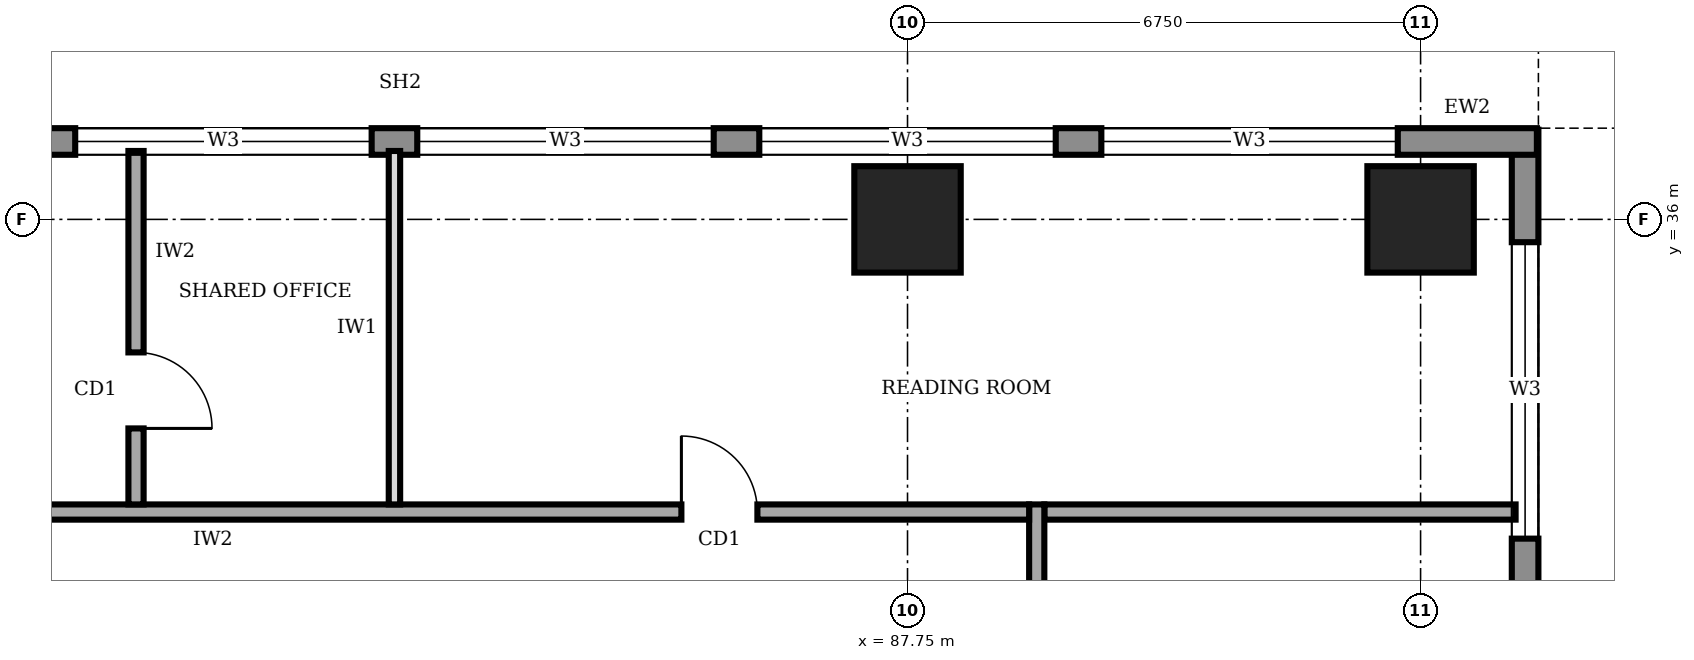
"""IFC4 building model, lengths in metres.
Left out: names, types, materials, properties, quantities, classifications, styles, units other than length and angle.
Written with IfcOpenShell. Run it as: python <this file> out.ifc"""

import sys

from ifc_helpers import new_model, si_unit, direction, frame, frame_2d, origin, origin_2d, place, context, subcontext, project, spatial, rectangle, extrude, element, fill, save


model = new_model("IFC4")
c1 = context("Model", 3, precision=1e-05, world=origin(), true_north=direction((0.0, 1.0)))
c2 = subcontext(c1, "Body", "Model", "MODEL_VIEW")
j1 = project(units=[si_unit("LENGTHUNIT", "METRE"), si_unit("PLANEANGLEUNIT", "RADIAN")], contexts=[c1])
p1 = place(None, origin())
s1 = spatial("IfcSite", under=j1, at=p1, CompositionType="ELEMENT")
p2 = place(p1, origin())
s2 = spatial("IfcBuilding", under=s1, at=p2, CompositionType="ELEMENT")
p3 = place(p2, frame((0.0, 0.0, 177.0)))
s3 = spatial("IfcBuildingStorey", under=s2, at=p3, CompositionType="ELEMENT", Elevation=177.0)
for number, where, z_axis, x_axis in (
    (1, (87.75, 36.0, 0.0), (0.0, 0.0, 1.0), (1.0, 0.0, 0.0)),
    (2, (94.5, 36.0, 0.0), (0.0, 0.0, 1.0), (1.0, 0.0, 0.0)),
):
    element("IfcColumn", number, at=place(p3, frame(where, z_axis=z_axis, x_axis=x_axis)), inside=s3, PredefinedType="COLUMN", context=c2, shape_type="SweptSolid", body=[
        extrude(rectangle(XDim=1.4, YDim=1.4, at=origin_2d()), origin(), (0.0, 0.0, 1.0), 4.0),
    ])
p4 = place(p3, frame((95.875, 3.32, 0.0), z_axis=(0.0, 0.0, 1.0), x_axis=(0.0, 1.0, 0.0)))
e3 = element("IfcWall", 3, at=p4, inside=s3, PredefinedType="STANDARD", context=c2, shape_type="SweptSolid", body=[
    extrude(rectangle(XDim=33.86, YDim=0.35, at=frame_2d((16.93, 0.0))), origin(), (0.0, 0.0, 1.0), 3.75),
])
p5 = place(p4, frame((1.48, 0.0, 0.95)))
e4 = element("IfcOpeningElement", 4, at=p5, cuts=e3, PredefinedType="OPENING", context=c2, shape_type="SweptSolid", body=[
    extrude(rectangle(XDim=3.9, YDim=1.8, at=frame_2d((1.95, 0.9))), frame((0.0, 0.185, 0.0), z_axis=(0.0, -1.0, 0.0), x_axis=(1.0, 0.0, 0.0)), (0.0, 0.0, 1.0), 0.37),
])
p6 = place(p4, frame((5.98, 0.0, 0.95)))
e5 = element("IfcOpeningElement", 5, at=p6, cuts=e3, PredefinedType="OPENING", context=c2, shape_type="SweptSolid", body=[
    extrude(rectangle(XDim=3.9, YDim=1.8, at=frame_2d((1.95, 0.9))), frame((0.0, 0.185, 0.0), z_axis=(0.0, -1.0, 0.0), x_axis=(1.0, 0.0, 0.0)), (0.0, 0.0, 1.0), 0.37),
])
p7 = place(p4, frame((10.48, 0.0, 0.95)))
e6 = element("IfcOpeningElement", 6, at=p7, cuts=e3, PredefinedType="OPENING", context=c2, shape_type="SweptSolid", body=[
    extrude(rectangle(XDim=3.9, YDim=1.8, at=frame_2d((1.95, 0.9))), frame((0.0, 0.185, 0.0), z_axis=(0.0, -1.0, 0.0), x_axis=(1.0, 0.0, 0.0)), (0.0, 0.0, 1.0), 0.37),
])
p8 = place(p4, frame((14.98, 0.0, 0.95)))
e7 = element("IfcOpeningElement", 7, at=p8, cuts=e3, PredefinedType="OPENING", context=c2, shape_type="SweptSolid", body=[
    extrude(rectangle(XDim=3.9, YDim=1.8, at=frame_2d((1.95, 0.9))), frame((0.0, 0.185, 0.0), z_axis=(0.0, -1.0, 0.0), x_axis=(1.0, 0.0, 0.0)), (0.0, 0.0, 1.0), 0.37),
])
p9 = place(p4, frame((19.48, 0.0, 0.95)))
e8 = element("IfcOpeningElement", 8, at=p9, cuts=e3, PredefinedType="OPENING", context=c2, shape_type="SweptSolid", body=[
    extrude(rectangle(XDim=3.9, YDim=1.8, at=frame_2d((1.95, 0.9))), frame((0.0, 0.185, 0.0), z_axis=(0.0, -1.0, 0.0), x_axis=(1.0, 0.0, 0.0)), (0.0, 0.0, 1.0), 0.37),
])
p10 = place(p4, frame((23.98, 0.0, 0.95)))
e9 = element("IfcOpeningElement", 9, at=p10, cuts=e3, PredefinedType="OPENING", context=c2, shape_type="SweptSolid", body=[
    extrude(rectangle(XDim=3.9, YDim=1.8, at=frame_2d((1.95, 0.9))), frame((0.0, 0.185, 0.0), z_axis=(0.0, -1.0, 0.0), x_axis=(1.0, 0.0, 0.0)), (0.0, 0.0, 1.0), 0.37),
])
p11 = place(p4, frame((28.48, 0.0, 0.95)))
e10 = element("IfcOpeningElement", 10, at=p11, cuts=e3, PredefinedType="OPENING", context=c2, shape_type="SweptSolid", body=[
    extrude(rectangle(XDim=3.9, YDim=1.8, at=frame_2d((1.95, 0.9))), frame((0.0, 0.185, 0.0), z_axis=(0.0, -1.0, 0.0), x_axis=(1.0, 0.0, 0.0)), (0.0, 0.0, 1.0), 0.37),
])
p12 = place(p3, frame((96.03, 37.025, 0.0), z_axis=(0.0, 0.0, 1.0), x_axis=(-1.0, 0.0, 0.0)))
e11 = element("IfcWall", 11, at=p12, inside=s3, PredefinedType="STANDARD", context=c2, shape_type="SweptSolid", body=[
    extrude(rectangle(XDim=29.91, YDim=0.35, at=frame_2d((14.955, 0.0))), origin(), (0.0, 0.0, 1.0), 3.75),
])
p13 = place(p12, frame((24.33, 0.0, 0.95)))
e12 = element("IfcOpeningElement", 12, at=p13, cuts=e11, PredefinedType="OPENING", context=c2, shape_type="SweptSolid", body=[
    extrude(rectangle(XDim=3.9, YDim=1.8, at=frame_2d((1.95, 0.9))), frame((0.0, 0.185, 0.0), z_axis=(0.0, -1.0, 0.0), x_axis=(1.0, 0.0, 0.0)), (0.0, 0.0, 1.0), 0.37),
])
p14 = place(p12, frame((19.83, 0.0, 0.95)))
e13 = element("IfcOpeningElement", 13, at=p14, cuts=e11, PredefinedType="OPENING", context=c2, shape_type="SweptSolid", body=[
    extrude(rectangle(XDim=3.9, YDim=1.8, at=frame_2d((1.95, 0.9))), frame((0.0, 0.185, 0.0), z_axis=(0.0, -1.0, 0.0), x_axis=(1.0, 0.0, 0.0)), (0.0, 0.0, 1.0), 0.37),
])
p15 = place(p12, frame((15.33, 0.0, 0.95)))
e14 = element("IfcOpeningElement", 14, at=p15, cuts=e11, PredefinedType="OPENING", context=c2, shape_type="SweptSolid", body=[
    extrude(rectangle(XDim=3.9, YDim=1.8, at=frame_2d((1.95, 0.9))), frame((0.0, 0.185, 0.0), z_axis=(0.0, -1.0, 0.0), x_axis=(1.0, 0.0, 0.0)), (0.0, 0.0, 1.0), 0.37),
])
p16 = place(p12, frame((10.83, 0.0, 0.95)))
e15 = element("IfcOpeningElement", 15, at=p16, cuts=e11, PredefinedType="OPENING", context=c2, shape_type="SweptSolid", body=[
    extrude(rectangle(XDim=3.9, YDim=1.8, at=frame_2d((1.95, 0.9))), frame((0.0, 0.185, 0.0), z_axis=(0.0, -1.0, 0.0), x_axis=(1.0, 0.0, 0.0)), (0.0, 0.0, 1.0), 0.37),
])
p17 = place(p12, frame((6.33, 0.0, 0.95)))
e16 = element("IfcOpeningElement", 16, at=p17, cuts=e11, PredefinedType="OPENING", context=c2, shape_type="SweptSolid", body=[
    extrude(rectangle(XDim=3.9, YDim=1.8, at=frame_2d((1.95, 0.9))), frame((0.0, 0.185, 0.0), z_axis=(0.0, -1.0, 0.0), x_axis=(1.0, 0.0, 0.0)), (0.0, 0.0, 1.0), 0.37),
])
p18 = place(p12, frame((1.83, 0.0, 0.95)))
e17 = element("IfcOpeningElement", 17, at=p18, cuts=e11, PredefinedType="OPENING", context=c2, shape_type="SweptSolid", body=[
    extrude(rectangle(XDim=3.9, YDim=1.8, at=frame_2d((1.95, 0.9))), frame((0.0, 0.185, 0.0), z_axis=(0.0, -1.0, 0.0), x_axis=(1.0, 0.0, 0.0)), (0.0, 0.0, 1.0), 0.37),
])
p19 = place(p3, frame((89.45, 9.2, 0.0), z_axis=(0.0, 0.0, 1.0), x_axis=(0.0, 1.0, 0.0)))
e18 = element("IfcWall", 18, at=p19, inside=s3, PredefinedType="SOLIDWALL", context=c2, shape_type="SweptSolid", body=[
    extrude(rectangle(XDim=23.05, YDim=0.2, at=frame_2d((11.525, 0.0))), origin(), (0.0, 0.0, 1.0), 3.75),
])
p20 = place(p19, frame((1.55, 0.0, 0.0)))
e19 = element("IfcOpeningElement", 19, at=p20, cuts=e18, PredefinedType="OPENING", context=c2, shape_type="SweptSolid", body=[
    extrude(rectangle(XDim=1.0, YDim=2.1, at=frame_2d((0.5, 1.05))), frame((0.0, 0.11, 0.0), z_axis=(0.0, -1.0, 0.0), x_axis=(1.0, 0.0, 0.0)), (0.0, 0.0, 1.0), 0.22),
])
p21 = place(p19, frame((5.55, 0.0, 0.0)))
e20 = element("IfcOpeningElement", 20, at=p21, cuts=e18, PredefinedType="OPENING", context=c2, shape_type="SweptSolid", body=[
    extrude(rectangle(XDim=0.9, YDim=2.1, at=frame_2d((0.45, 1.05))), frame((0.0, 0.11, 0.0), z_axis=(0.0, -1.0, 0.0), x_axis=(1.0, 0.0, 0.0)), (0.0, 0.0, 1.0), 0.22),
])
p22 = place(p19, frame((10.35, 0.0, 0.0)))
e21 = element("IfcOpeningElement", 21, at=p22, cuts=e18, PredefinedType="OPENING", context=c2, shape_type="SweptSolid", body=[
    extrude(rectangle(XDim=0.9, YDim=2.1, at=frame_2d((0.45, 1.05))), frame((0.0, 0.11, 0.0), z_axis=(0.0, -1.0, 0.0), x_axis=(1.0, 0.0, 0.0)), (0.0, 0.0, 1.0), 0.22),
])
p23 = place(p19, frame((13.4, 0.0, 0.0)))
e22 = element("IfcOpeningElement", 22, at=p23, cuts=e18, PredefinedType="OPENING", context=c2, shape_type="SweptSolid", body=[
    extrude(rectangle(XDim=0.9, YDim=2.1, at=frame_2d((0.45, 1.05))), frame((0.0, 0.11, 0.0), z_axis=(0.0, -1.0, 0.0), x_axis=(1.0, 0.0, 0.0)), (0.0, 0.0, 1.0), 0.22),
])
p24 = place(p19, frame((16.3, 0.0, 0.0)))
e23 = element("IfcOpeningElement", 23, at=p24, cuts=e18, PredefinedType="OPENING", context=c2, shape_type="SweptSolid", body=[
    extrude(rectangle(XDim=1.0, YDim=2.1, at=frame_2d((0.5, 1.05))), frame((0.0, 0.11, 0.0), z_axis=(0.0, -1.0, 0.0), x_axis=(1.0, 0.0, 0.0)), (0.0, 0.0, 1.0), 0.22),
])
p25 = place(p19, frame((8.2, 0.0, 0.0)))
e24 = element("IfcOpeningElement", 24, at=p25, cuts=e18, PredefinedType="OPENING", context=c2, shape_type="SweptSolid", body=[
    extrude(rectangle(XDim=1.0, YDim=2.1, at=frame_2d((0.5, 1.05))), frame((0.0, 0.11, 0.0), z_axis=(0.0, -1.0, 0.0), x_axis=(1.0, 0.0, 0.0)), (0.0, 0.0, 1.0), 0.22),
])
p26 = place(p19, frame((19.925, 0.0, 0.0)))
e25 = element("IfcOpeningElement", 25, at=p26, cuts=e18, PredefinedType="OPENING", context=c2, shape_type="SweptSolid", body=[
    extrude(rectangle(XDim=1.0, YDim=2.1, at=frame_2d((0.5, 1.05))), frame((0.0, 0.11, 0.0), z_axis=(0.0, -1.0, 0.0), x_axis=(1.0, 0.0, 0.0)), (0.0, 0.0, 1.0), 0.22),
])
p27 = place(p3, frame((89.35, 32.15, 0.0), z_axis=(0.0, 0.0, 1.0), x_axis=(-1.0, 0.0, 0.0)))
e26 = element("IfcWall", 26, at=p27, inside=s3, PredefinedType="SOLIDWALL", context=c2, shape_type="SweptSolid", body=[
    extrude(rectangle(XDim=16.9, YDim=0.2, at=frame_2d((8.45, 0.0))), origin(), (0.0, 0.0, 1.0), 3.75),
])
p28 = place(p27, frame((3.575, 0.0, 0.0)))
e27 = element("IfcOpeningElement", 27, at=p28, cuts=e26, PredefinedType="OPENING", context=c2, shape_type="SweptSolid", body=[
    extrude(rectangle(XDim=1.0, YDim=2.1, at=frame_2d((0.5, 1.05))), frame((0.0, 0.11, 0.0), z_axis=(0.0, -1.0, 0.0), x_axis=(1.0, 0.0, 0.0)), (0.0, 0.0, 1.0), 0.22),
])
p29 = place(p3, frame((77.6, 36.9, 0.0), z_axis=(0.0, 0.0, 1.0), x_axis=(0.0, -1.0, 0.0)))
e28 = element("IfcWall", 28, at=p29, inside=s3, PredefinedType="SOLIDWALL", context=c2, shape_type="SweptSolid", body=[
    extrude(rectangle(XDim=4.65, YDim=0.2, at=frame_2d((2.325, 0.0))), origin(), (0.0, 0.0, 1.0), 3.75),
])
p30 = place(p29, frame((2.65, 0.0, 0.0)))
e29 = element("IfcOpeningElement", 29, at=p30, cuts=e28, PredefinedType="OPENING", context=c2, shape_type="SweptSolid", body=[
    extrude(rectangle(XDim=1.0, YDim=2.1, at=frame_2d((0.5, 1.05))), frame((0.0, 0.11, 0.0), z_axis=(0.0, -1.0, 0.0), x_axis=(1.0, 0.0, 0.0)), (0.0, 0.0, 1.0), 0.22),
])
p31 = place(p3, frame((89.55, 32.15, 0.0), z_axis=(0.0, 0.0, 1.0), x_axis=(1.0, 0.0, 0.0)))
e30 = element("IfcWall", 30, at=p31, inside=s3, PredefinedType="SOLIDWALL", context=c2, shape_type="SweptSolid", body=[
    extrude(rectangle(XDim=6.2, YDim=0.2, at=frame_2d((3.1, 0.0))), origin(), (0.0, 0.0, 1.0), 3.75),
])
p32 = place(p3, frame((81.0, 32.25, 0.0), z_axis=(0.0, 0.0, 1.0), x_axis=(0.0, 1.0, 0.0)))
e31 = element("IfcWall", 31, at=p32, inside=s3, PredefinedType="PARTITIONING", context=c2, shape_type="SweptSolid", body=[
    extrude(rectangle(XDim=4.65, YDim=0.15, at=frame_2d((2.325, 0.0))), origin(), (0.0, 0.0, 1.0), 3.75),
])
p33 = place(p11, origin())
e32 = element("IfcWindow", 32, at=p33, inside=s3, PartitioningType="SINGLE_PANEL", PredefinedType="WINDOW", context=c2, shape_type="SweptSolid", body=[
    extrude(rectangle(XDim=3.9, YDim=1.8, at=frame_2d((1.95, 0.9))), frame((0.0, 0.03, 0.0), z_axis=(0.0, -1.0, 0.0), x_axis=(1.0, 0.0, 0.0)), (0.0, 0.0, 1.0), 0.06),
])
fill(e10, e32)
p34 = place(p15, origin())
e33 = element("IfcWindow", 33, at=p34, inside=s3, PartitioningType="SINGLE_PANEL", PredefinedType="WINDOW", context=c2, shape_type="SweptSolid", body=[
    extrude(rectangle(XDim=3.9, YDim=1.8, at=frame_2d((1.95, 0.9))), frame((0.0, 0.03, 0.0), z_axis=(0.0, -1.0, 0.0), x_axis=(1.0, 0.0, 0.0)), (0.0, 0.0, 1.0), 0.06),
])
fill(e14, e33)
p35 = place(p16, origin())
e34 = element("IfcWindow", 34, at=p35, inside=s3, PartitioningType="SINGLE_PANEL", PredefinedType="WINDOW", context=c2, shape_type="SweptSolid", body=[
    extrude(rectangle(XDim=3.9, YDim=1.8, at=frame_2d((1.95, 0.9))), frame((0.0, 0.03, 0.0), z_axis=(0.0, -1.0, 0.0), x_axis=(1.0, 0.0, 0.0)), (0.0, 0.0, 1.0), 0.06),
])
fill(e15, e34)
p36 = place(p17, origin())
e35 = element("IfcWindow", 35, at=p36, inside=s3, PartitioningType="SINGLE_PANEL", PredefinedType="WINDOW", context=c2, shape_type="SweptSolid", body=[
    extrude(rectangle(XDim=3.9, YDim=1.8, at=frame_2d((1.95, 0.9))), frame((0.0, 0.03, 0.0), z_axis=(0.0, -1.0, 0.0), x_axis=(1.0, 0.0, 0.0)), (0.0, 0.0, 1.0), 0.06),
])
fill(e16, e35)
p37 = place(p18, origin())
e36 = element("IfcWindow", 36, at=p37, inside=s3, PartitioningType="SINGLE_PANEL", PredefinedType="WINDOW", context=c2, shape_type="SweptSolid", body=[
    extrude(rectangle(XDim=3.9, YDim=1.8, at=frame_2d((1.95, 0.9))), frame((0.0, 0.03, 0.0), z_axis=(0.0, -1.0, 0.0), x_axis=(1.0, 0.0, 0.0)), (0.0, 0.0, 1.0), 0.06),
])
fill(e17, e36)
p38 = place(p28, frame((1.0, 0.0, 0.0), z_axis=(0.0, 0.0, 1.0), x_axis=(-1.0, 0.0, 0.0)))
e37 = element("IfcDoor", 37, at=p38, inside=s3, OperationType="SINGLE_SWING_LEFT", PredefinedType="DOOR", context=c2, shape_type="SweptSolid", body=[
    extrude(rectangle(XDim=1.0, YDim=2.1, at=frame_2d((0.5, 1.05))), frame((0.0, 0.025, 0.0), z_axis=(0.0, -1.0, 0.0), x_axis=(1.0, 0.0, 0.0)), (0.0, 0.0, 1.0), 0.05),
])
fill(e27, e37)
p39 = place(p30, origin())
e38 = element("IfcDoor", 38, at=p39, inside=s3, OperationType="SINGLE_SWING_RIGHT", PredefinedType="DOOR", context=c2, shape_type="SweptSolid", body=[
    extrude(rectangle(XDim=1.0, YDim=2.1, at=frame_2d((0.5, 1.05))), frame((0.0, 0.025, 0.0), z_axis=(0.0, -1.0, 0.0), x_axis=(1.0, 0.0, 0.0)), (0.0, 0.0, 1.0), 0.05),
])
fill(e29, e38)
save(model, sys.argv[1])
